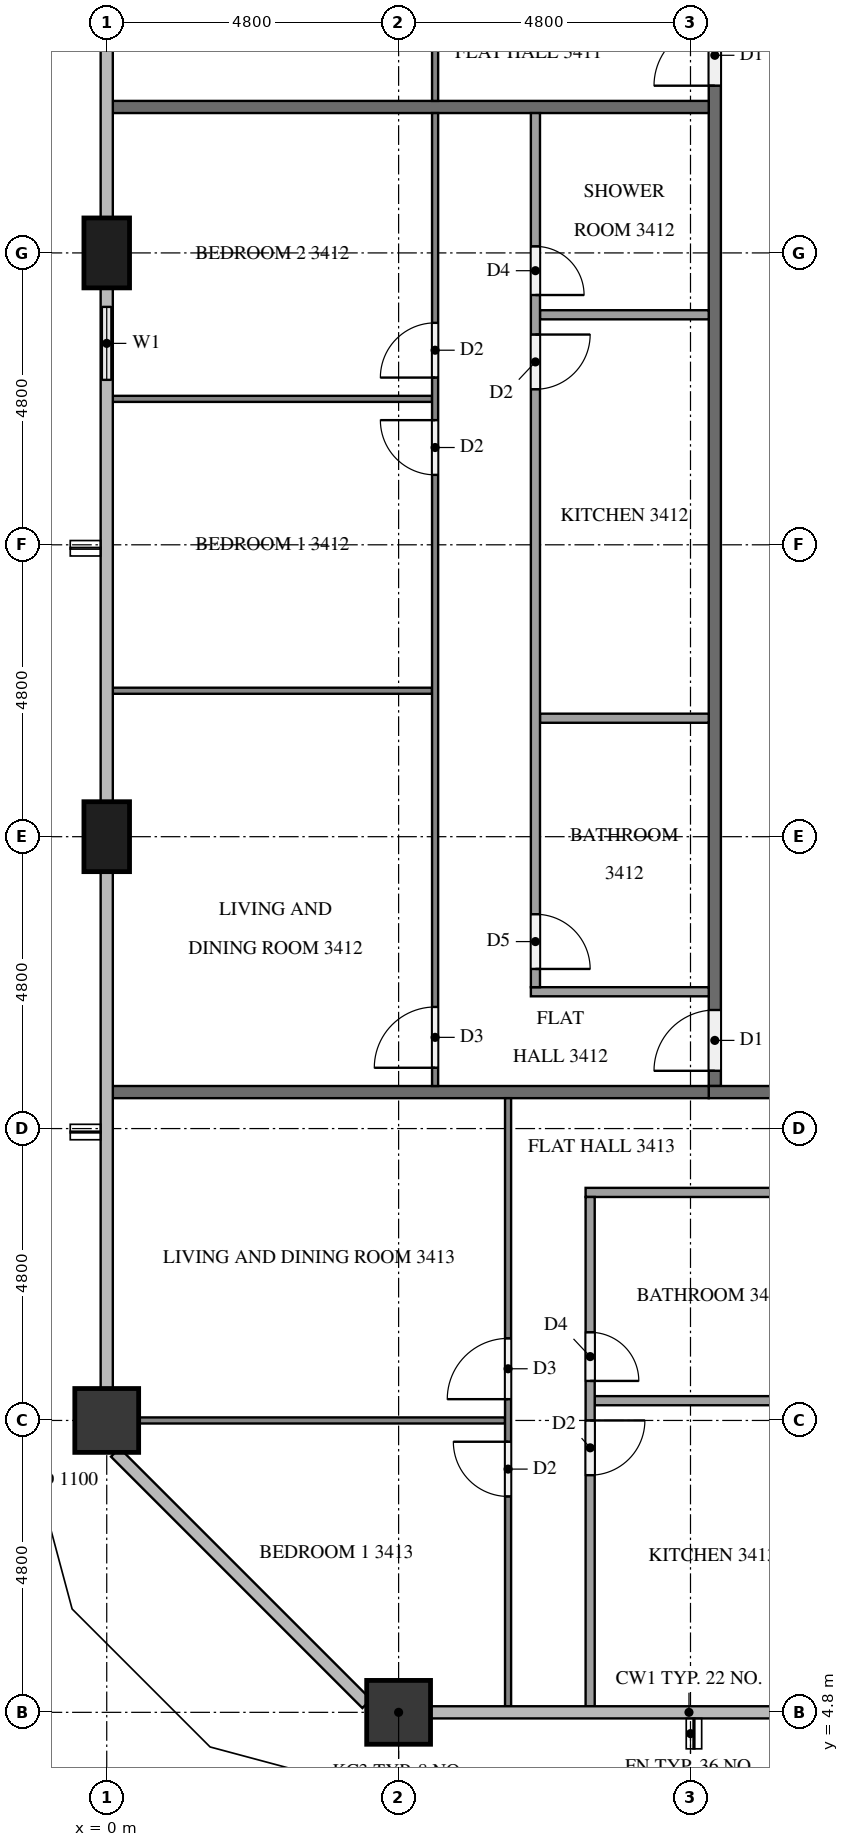
"""IFC4 building model, lengths in metres.
Left out: names, types, materials, properties, quantities, classifications, styles, units other than length and angle.
Written with IfcOpenShell. Run it as: python <this file> out.ifc"""

import sys

from ifc_helpers import new_model, si_unit, direction, frame, frame_2d, origin, origin_2d, place, context, subcontext, project, spatial, rectangle, extrude, element, fill, save


model = new_model("IFC4")
c1 = context("Model", 3, precision=1e-05, world=origin(), true_north=direction((0.0, 1.0)))
c2 = subcontext(c1, "Body", "Model", "MODEL_VIEW")
j1 = project(units=[si_unit("LENGTHUNIT", "METRE"), si_unit("PLANEANGLEUNIT", "RADIAN")], contexts=[c1])
p1 = place(None, origin())
s1 = spatial("IfcSite", under=j1, at=p1, CompositionType="ELEMENT")
p2 = place(p1, origin())
s2 = spatial("IfcBuilding", under=s1, at=p2, CompositionType="ELEMENT")
p3 = place(p2, frame((0.0, 0.0, 133.1)))
s3 = spatial("IfcBuildingStorey", under=s2, at=p3, CompositionType="ELEMENT", Elevation=133.1)
p4 = place(p3, frame((4.8, 4.8, 0.0), z_axis=(0.0, 0.0, 1.0), x_axis=(1.0, 0.0, 0.0)))
e1 = element("IfcColumn", 1, at=p4, inside=s3, PredefinedType="COLUMN", context=c2, shape_type="SweptSolid", body=[
    extrude(rectangle(XDim=1.05, YDim=1.05, at=origin_2d()), origin(), (0.0, 0.0, 1.0), 3.2),
])
for number, where, z_axis, x_axis in (
    (2, (0.0, 28.8, 0.0), (0.0, 0.0, 1.0), (0.0, 1.0, 0.0)),
    (3, (0.0, 19.2, 0.0), (0.0, 0.0, 1.0), (0.0, 1.0, 0.0)),
):
    element("IfcColumn", number, at=place(p3, frame(where, z_axis=z_axis, x_axis=x_axis)), inside=s3, PredefinedType="COLUMN", context=c2, shape_type="SweptSolid", body=[
        extrude(rectangle(XDim=1.15, YDim=0.75, at=origin_2d()), origin(), (0.0, 0.0, 1.0), 3.2),
    ])
p5 = place(p3, frame((0.0, 9.6, 0.0), z_axis=(0.0, 0.0, 1.0), x_axis=(1.0, 0.0, 0.0)))
e4 = element("IfcColumn", 4, at=p5, inside=s3, PredefinedType="COLUMN", context=c2, shape_type="SweptSolid", body=[
    extrude(rectangle(XDim=1.05, YDim=1.05, at=origin_2d()), origin(), (0.0, 0.0, 1.0), 3.2),
])
p6 = place(p3, frame((0.0, 28.225, 0.0), z_axis=(0.0, 0.0, 1.0), x_axis=(0.0, -1.0, 0.0)))
e5 = element("IfcWall", 5, at=p6, inside=s3, PredefinedType="SOLIDWALL", context=c2, shape_type="SweptSolid", body=[
    extrude(rectangle(XDim=1.825, YDim=0.15, at=frame_2d((0.913, 0.0))), origin(), (0.0, 0.0, 1.0), 3.2),
])
p7 = place(p6, frame((0.312, 0.0, 0.9)))
e6 = element("IfcOpeningElement", 6, at=p7, cuts=e5, PredefinedType="OPENING", context=c2, shape_type="SweptSolid", body=[
    extrude(rectangle(XDim=1.2, YDim=1.4, at=frame_2d((0.6, 0.7))), frame((0.0, 0.085, 0.0), z_axis=(0.0, -1.0, 0.0), x_axis=(1.0, 0.0, 0.0)), (0.0, 0.0, 1.0), 0.17),
])
p8 = place(p3, frame((10.0, 15.1, 0.0), z_axis=(0.0, 0.0, 1.0), x_axis=(0.0, 1.0, 0.0)))
e7 = element("IfcWall", 7, at=p8, inside=s3, PredefinedType="PARTITIONING", context=c2, shape_type="SweptSolid", body=[
    extrude(rectangle(XDim=22.6, YDim=0.2, at=frame_2d((11.3, 0.0))), origin(), (0.0, 0.0, 1.0), 3.2),
])
p9 = place(p8, frame((16.45, 0.0, 0.0)))
e8 = element("IfcOpeningElement", 8, at=p9, cuts=e7, PredefinedType="OPENING", context=c2, shape_type="SweptSolid", body=[
    extrude(rectangle(XDim=1.0, YDim=2.1, at=frame_2d((0.5, 1.05))), frame((0.0, 0.11, 0.0), z_axis=(0.0, -1.0, 0.0), x_axis=(1.0, 0.0, 0.0)), (0.0, 0.0, 1.0), 0.22),
])
p10 = place(p8, frame((0.25, 0.0, 0.0)))
e9 = element("IfcOpeningElement", 9, at=p10, cuts=e7, PredefinedType="OPENING", context=c2, shape_type="SweptSolid", body=[
    extrude(rectangle(XDim=1.0, YDim=2.1, at=frame_2d((0.5, 1.05))), frame((0.0, 0.11, 0.0), z_axis=(0.0, -1.0, 0.0), x_axis=(1.0, 0.0, 0.0)), (0.0, 0.0, 1.0), 0.22),
])
p11 = place(p3, frame((9.9, 15.0, 0.0), z_axis=(0.0, 0.0, 1.0), x_axis=(1.0, 0.0, 0.0)))
e10 = element("IfcWall", 10, at=p11, inside=s3, PredefinedType="PARTITIONING", context=c2, shape_type="SweptSolid", body=[
    extrude(rectangle(XDim=2.2, YDim=0.2, at=frame_2d((1.1, 0.0))), origin(), (0.0, 0.0, 1.0), 3.2),
])
for number, where, z_axis, x_axis in (
    (11, (0.1, 31.2, 0.0), (0.0, 0.0, 1.0), (1.0, 0.0, 0.0)),
    (12, (0.1, 15.0, 0.0), (0.0, 0.0, 1.0), (1.0, 0.0, 0.0)),
):
    element("IfcWall", number, at=place(p3, frame(where, z_axis=z_axis, x_axis=x_axis)), inside=s3, PredefinedType="PARTITIONING", context=c2, shape_type="SweptSolid", body=[
        extrude(rectangle(XDim=9.8, YDim=0.2, at=frame_2d((4.9, 0.0))), origin(), (0.0, 0.0, 1.0), 3.2),
    ])
p12 = place(p3, frame((5.4, 31.3, 0.0), z_axis=(0.0, 0.0, 1.0), x_axis=(0.0, 1.0, 0.0)))
e13 = element("IfcWall", 13, at=p12, inside=s3, PredefinedType="PARTITIONING", context=c2, shape_type="SweptSolid", body=[
    extrude(rectangle(XDim=6.4, YDim=0.1, at=frame_2d((3.2, 0.0))), origin(), (0.0, 0.0, 1.0), 3.2),
])
p13 = place(p12, frame((5.1, 0.0, 0.0)))
e14 = element("IfcOpeningElement", 14, at=p13, cuts=e13, PredefinedType="OPENING", context=c2, shape_type="SweptSolid", body=[
    extrude(rectangle(XDim=1.0, YDim=2.1, at=frame_2d((0.5, 1.05))), frame((0.0, 0.06, 0.0), z_axis=(0.0, -1.0, 0.0), x_axis=(1.0, 0.0, 0.0)), (0.0, 0.0, 1.0), 0.12),
])
for number, where, z_axis, x_axis in (
    (15, (5.35, 21.6, 0.0), (0.0, 0.0, 1.0), (-1.0, 0.0, 0.0)),
    (16, (5.35, 26.4, 0.0), (0.0, 0.0, 1.0), (-1.0, 0.0, 0.0)),
):
    element("IfcWall", number, at=place(p3, frame(where, z_axis=z_axis, x_axis=x_axis)), inside=s3, PredefinedType="PARTITIONING", context=c2, shape_type="SweptSolid", body=[
        extrude(rectangle(XDim=5.25, YDim=0.1, at=frame_2d((2.625, 0.0))), origin(), (0.0, 0.0, 1.0), 3.2),
    ])
p14 = place(p3, frame((5.4, 15.1, 0.0), z_axis=(0.0, 0.0, 1.0), x_axis=(0.0, 1.0, 0.0)))
e17 = element("IfcWall", 17, at=p14, inside=s3, PredefinedType="PARTITIONING", context=c2, shape_type="SweptSolid", body=[
    extrude(rectangle(XDim=16.0, YDim=0.1, at=frame_2d((8.0, 0.0))), origin(), (0.0, 0.0, 1.0), 3.2),
])
p15 = place(p14, frame((0.3, 0.0, 0.0)))
e18 = element("IfcOpeningElement", 18, at=p15, cuts=e17, PredefinedType="OPENING", context=c2, shape_type="SweptSolid", body=[
    extrude(rectangle(XDim=1.0, YDim=2.1, at=frame_2d((0.5, 1.05))), frame((0.0, 0.06, 0.0), z_axis=(0.0, -1.0, 0.0), x_axis=(1.0, 0.0, 0.0)), (0.0, 0.0, 1.0), 0.12),
])
p16 = place(p14, frame((10.05, 0.0, 0.0)))
e19 = element("IfcOpeningElement", 19, at=p16, cuts=e17, PredefinedType="OPENING", context=c2, shape_type="SweptSolid", body=[
    extrude(rectangle(XDim=0.9, YDim=2.1, at=frame_2d((0.45, 1.05))), frame((0.0, 0.06, 0.0), z_axis=(0.0, -1.0, 0.0), x_axis=(1.0, 0.0, 0.0)), (0.0, 0.0, 1.0), 0.12),
])
p17 = place(p14, frame((11.65, 0.0, 0.0)))
e20 = element("IfcOpeningElement", 20, at=p17, cuts=e17, PredefinedType="OPENING", context=c2, shape_type="SweptSolid", body=[
    extrude(rectangle(XDim=0.9, YDim=2.1, at=frame_2d((0.45, 1.05))), frame((0.0, 0.06, 0.0), z_axis=(0.0, -1.0, 0.0), x_axis=(1.0, 0.0, 0.0)), (0.0, 0.0, 1.0), 0.12),
])
for number, where, z_axis, x_axis in (
    (21, (9.9, 21.148, 0.0), (0.0, 0.0, 1.0), (-1.0, 0.0, 0.0)),
    (22, (9.9, 27.783, 0.0), (0.0, 0.0, 1.0), (-1.0, 0.0, 0.0)),
):
    element("IfcWall", number, at=place(p3, frame(where, z_axis=z_axis, x_axis=x_axis)), inside=s3, PredefinedType="PARTITIONING", context=c2, shape_type="SweptSolid", body=[
        extrude(rectangle(XDim=2.775, YDim=0.15, at=frame_2d((1.387, 0.0))), origin(), (0.0, 0.0, 1.0), 3.2),
    ])
p18 = place(p3, frame((9.9, 16.65, 0.0), z_axis=(0.0, 0.0, 1.0), x_axis=(-1.0, 0.0, 0.0)))
e23 = element("IfcWall", 23, at=p18, inside=s3, PredefinedType="PARTITIONING", context=c2, shape_type="SweptSolid", body=[
    extrude(rectangle(XDim=2.925, YDim=0.15, at=frame_2d((1.462, 0.0))), origin(), (0.0, 0.0, 1.0), 3.2),
])
p19 = place(p3, frame((7.05, 31.1, 0.0), z_axis=(0.0, 0.0, 1.0), x_axis=(0.0, -1.0, 0.0)))
e24 = element("IfcWall", 24, at=p19, inside=s3, PredefinedType="PARTITIONING", context=c2, shape_type="SweptSolid", body=[
    extrude(rectangle(XDim=14.375, YDim=0.15, at=frame_2d((7.188, 0.0))), origin(), (0.0, 0.0, 1.0), 3.2),
])
p20 = place(p19, frame((13.175, 0.0, 0.0)))
e25 = element("IfcOpeningElement", 25, at=p20, cuts=e24, PredefinedType="OPENING", context=c2, shape_type="SweptSolid", body=[
    extrude(rectangle(XDim=0.9, YDim=2.1, at=frame_2d((0.45, 1.05))), frame((0.0, 0.085, 0.0), z_axis=(0.0, -1.0, 0.0), x_axis=(1.0, 0.0, 0.0)), (0.0, 0.0, 1.0), 0.17),
])
p21 = place(p19, frame((3.642, 0.0, 0.0)))
e26 = element("IfcOpeningElement", 26, at=p21, cuts=e24, PredefinedType="OPENING", context=c2, shape_type="SweptSolid", body=[
    extrude(rectangle(XDim=0.9, YDim=2.1, at=frame_2d((0.45, 1.05))), frame((0.0, 0.085, 0.0), z_axis=(0.0, -1.0, 0.0), x_axis=(1.0, 0.0, 0.0)), (0.0, 0.0, 1.0), 0.17),
])
p22 = place(p19, frame((2.192, 0.0, 0.0)))
e27 = element("IfcOpeningElement", 27, at=p22, cuts=e24, PredefinedType="OPENING", context=c2, shape_type="SweptSolid", body=[
    extrude(rectangle(XDim=0.8, YDim=2.1, at=frame_2d((0.4, 1.05))), frame((0.0, 0.085, 0.0), z_axis=(0.0, -1.0, 0.0), x_axis=(1.0, 0.0, 0.0)), (0.0, 0.0, 1.0), 0.17),
])
p23 = place(p3, frame((6.55, 9.6, 0.0), z_axis=(0.0, 0.0, 1.0), x_axis=(-1.0, 0.0, 0.0)))
e28 = element("IfcWall", 28, at=p23, inside=s3, PredefinedType="PARTITIONING", context=c2, shape_type="SweptSolid", body=[
    extrude(rectangle(XDim=6.025, YDim=0.1, at=frame_2d((3.013, 0.0))), origin(), (0.0, 0.0, 1.0), 3.2),
])
p24 = place(p3, frame((6.6, 4.9, 0.0), z_axis=(0.0, 0.0, 1.0), x_axis=(0.0, 1.0, 0.0)))
e29 = element("IfcWall", 29, at=p24, inside=s3, PredefinedType="PARTITIONING", context=c2, shape_type="SweptSolid", body=[
    extrude(rectangle(XDim=10.0, YDim=0.1, at=frame_2d((5.0, 0.0))), origin(), (0.0, 0.0, 1.0), 3.2),
])
p25 = place(p24, frame((5.05, 0.0, 0.0)))
e30 = element("IfcOpeningElement", 30, at=p25, cuts=e29, PredefinedType="OPENING", context=c2, shape_type="SweptSolid", body=[
    extrude(rectangle(XDim=1.0, YDim=2.1, at=frame_2d((0.5, 1.05))), frame((0.0, 0.06, 0.0), z_axis=(0.0, -1.0, 0.0), x_axis=(1.0, 0.0, 0.0)), (0.0, 0.0, 1.0), 0.12),
])
p26 = place(p24, frame((3.45, 0.0, 0.0)))
e31 = element("IfcOpeningElement", 31, at=p26, cuts=e29, PredefinedType="OPENING", context=c2, shape_type="SweptSolid", body=[
    extrude(rectangle(XDim=0.9, YDim=2.1, at=frame_2d((0.45, 1.05))), frame((0.0, 0.06, 0.0), z_axis=(0.0, -1.0, 0.0), x_axis=(1.0, 0.0, 0.0)), (0.0, 0.0, 1.0), 0.12),
])
p27 = place(p3, frame((11.9, 9.925, 0.0), z_axis=(0.0, 0.0, 1.0), x_axis=(-1.0, 0.0, 0.0)))
e32 = element("IfcWall", 32, at=p27, inside=s3, PredefinedType="PARTITIONING", context=c2, shape_type="SweptSolid", body=[
    extrude(rectangle(XDim=3.875, YDim=0.15, at=frame_2d((1.938, 0.0))), origin(), (0.0, 0.0, 1.0), 3.2),
])
p28 = place(p3, frame((11.9, 13.35, 0.0), z_axis=(0.0, 0.0, 1.0), x_axis=(-1.0, 0.0, 0.0)))
e33 = element("IfcWall", 33, at=p28, inside=s3, PredefinedType="PARTITIONING", context=c2, shape_type="SweptSolid", body=[
    extrude(rectangle(XDim=4.025, YDim=0.15, at=frame_2d((2.012, 0.0))), origin(), (0.0, 0.0, 1.0), 3.2),
])
p29 = place(p3, frame((7.95, 13.275, 0.0), z_axis=(0.0, 0.0, 1.0), x_axis=(0.0, -1.0, 0.0)))
e34 = element("IfcWall", 34, at=p29, inside=s3, PredefinedType="PARTITIONING", context=c2, shape_type="SweptSolid", body=[
    extrude(rectangle(XDim=8.375, YDim=0.15, at=frame_2d((4.188, 0.0))), origin(), (0.0, 0.0, 1.0), 3.2),
])
p30 = place(p29, frame((2.225, 0.0, 0.0)))
e35 = element("IfcOpeningElement", 35, at=p30, cuts=e34, PredefinedType="OPENING", context=c2, shape_type="SweptSolid", body=[
    extrude(rectangle(XDim=0.8, YDim=2.1, at=frame_2d((0.4, 1.05))), frame((0.0, 0.085, 0.0), z_axis=(0.0, -1.0, 0.0), x_axis=(1.0, 0.0, 0.0)), (0.0, 0.0, 1.0), 0.17),
])
p31 = place(p29, frame((3.675, 0.0, 0.0)))
e36 = element("IfcOpeningElement", 36, at=p31, cuts=e34, PredefinedType="OPENING", context=c2, shape_type="SweptSolid", body=[
    extrude(rectangle(XDim=0.9, YDim=2.1, at=frame_2d((0.45, 1.05))), frame((0.0, 0.085, 0.0), z_axis=(0.0, -1.0, 0.0), x_axis=(1.0, 0.0, 0.0)), (0.0, 0.0, 1.0), 0.17),
])
p32 = place(p7, origin())
e37 = element("IfcWindow", 37, at=p32, inside=s3, PartitioningType="SINGLE_PANEL", PredefinedType="WINDOW", context=c2, shape_type="SweptSolid", body=[
    extrude(rectangle(XDim=1.2, YDim=1.4, at=frame_2d((0.6, 0.7))), frame((0.0, 0.03, 0.0), z_axis=(0.0, -1.0, 0.0), x_axis=(1.0, 0.0, 0.0)), (0.0, 0.0, 1.0), 0.06),
])
fill(e6, e37)
p33 = place(p9, origin())
e38 = element("IfcDoor", 38, at=p33, inside=s3, OperationType="SINGLE_SWING_LEFT", PredefinedType="DOOR", context=c2, shape_type="SweptSolid", body=[
    extrude(rectangle(XDim=1.0, YDim=2.1, at=frame_2d((0.5, 1.05))), frame((0.0, 0.025, 0.0), z_axis=(0.0, -1.0, 0.0), x_axis=(1.0, 0.0, 0.0)), (0.0, 0.0, 1.0), 0.05),
])
fill(e8, e38)
p34 = place(p10, origin())
e39 = element("IfcDoor", 39, at=p34, inside=s3, OperationType="SINGLE_SWING_LEFT", PredefinedType="DOOR", context=c2, shape_type="SweptSolid", body=[
    extrude(rectangle(XDim=1.0, YDim=2.1, at=frame_2d((0.5, 1.05))), frame((0.0, 0.025, 0.0), z_axis=(0.0, -1.0, 0.0), x_axis=(1.0, 0.0, 0.0)), (0.0, 0.0, 1.0), 0.05),
])
fill(e9, e39)
p35 = place(p15, origin())
e40 = element("IfcDoor", 40, at=p35, inside=s3, OperationType="SINGLE_SWING_LEFT", PredefinedType="DOOR", context=c2, shape_type="SweptSolid", body=[
    extrude(rectangle(XDim=1.0, YDim=2.1, at=frame_2d((0.5, 1.05))), frame((0.0, 0.025, 0.0), z_axis=(0.0, -1.0, 0.0), x_axis=(1.0, 0.0, 0.0)), (0.0, 0.0, 1.0), 0.05),
])
fill(e18, e40)
p36 = place(p16, origin())
e41 = element("IfcDoor", 41, at=p36, inside=s3, OperationType="SINGLE_SWING_RIGHT", PredefinedType="DOOR", context=c2, shape_type="SweptSolid", body=[
    extrude(rectangle(XDim=0.9, YDim=2.1, at=frame_2d((0.45, 1.05))), frame((0.0, 0.025, 0.0), z_axis=(0.0, -1.0, 0.0), x_axis=(1.0, 0.0, 0.0)), (0.0, 0.0, 1.0), 0.05),
])
fill(e19, e41)
p37 = place(p17, origin())
e42 = element("IfcDoor", 42, at=p37, inside=s3, OperationType="SINGLE_SWING_LEFT", PredefinedType="DOOR", context=c2, shape_type="SweptSolid", body=[
    extrude(rectangle(XDim=0.9, YDim=2.1, at=frame_2d((0.45, 1.05))), frame((0.0, 0.025, 0.0), z_axis=(0.0, -1.0, 0.0), x_axis=(1.0, 0.0, 0.0)), (0.0, 0.0, 1.0), 0.05),
])
fill(e20, e42)
p38 = place(p20, origin())
e43 = element("IfcDoor", 43, at=p38, inside=s3, OperationType="SINGLE_SWING_RIGHT", PredefinedType="DOOR", context=c2, shape_type="SweptSolid", body=[
    extrude(rectangle(XDim=0.9, YDim=2.1, at=frame_2d((0.45, 1.05))), frame((0.0, 0.025, 0.0), z_axis=(0.0, -1.0, 0.0), x_axis=(1.0, 0.0, 0.0)), (0.0, 0.0, 1.0), 0.05),
])
fill(e25, e43)
p39 = place(p21, origin())
e44 = element("IfcDoor", 44, at=p39, inside=s3, OperationType="SINGLE_SWING_LEFT", PredefinedType="DOOR", context=c2, shape_type="SweptSolid", body=[
    extrude(rectangle(XDim=0.9, YDim=2.1, at=frame_2d((0.45, 1.05))), frame((0.0, 0.025, 0.0), z_axis=(0.0, -1.0, 0.0), x_axis=(1.0, 0.0, 0.0)), (0.0, 0.0, 1.0), 0.05),
])
fill(e26, e44)
p40 = place(p22, origin())
e45 = element("IfcDoor", 45, at=p40, inside=s3, OperationType="SINGLE_SWING_RIGHT", PredefinedType="DOOR", context=c2, shape_type="SweptSolid", body=[
    extrude(rectangle(XDim=0.8, YDim=2.1, at=frame_2d((0.4, 1.05))), frame((0.0, 0.025, 0.0), z_axis=(0.0, -1.0, 0.0), x_axis=(1.0, 0.0, 0.0)), (0.0, 0.0, 1.0), 0.05),
])
fill(e27, e45)
p41 = place(p25, origin())
e46 = element("IfcDoor", 46, at=p41, inside=s3, OperationType="SINGLE_SWING_LEFT", PredefinedType="DOOR", context=c2, shape_type="SweptSolid", body=[
    extrude(rectangle(XDim=1.0, YDim=2.1, at=frame_2d((0.5, 1.05))), frame((0.0, 0.025, 0.0), z_axis=(0.0, -1.0, 0.0), x_axis=(1.0, 0.0, 0.0)), (0.0, 0.0, 1.0), 0.05),
])
fill(e30, e46)
p42 = place(p26, origin())
e47 = element("IfcDoor", 47, at=p42, inside=s3, OperationType="SINGLE_SWING_RIGHT", PredefinedType="DOOR", context=c2, shape_type="SweptSolid", body=[
    extrude(rectangle(XDim=0.9, YDim=2.1, at=frame_2d((0.45, 1.05))), frame((0.0, 0.025, 0.0), z_axis=(0.0, -1.0, 0.0), x_axis=(1.0, 0.0, 0.0)), (0.0, 0.0, 1.0), 0.05),
])
fill(e31, e47)
p43 = place(p30, origin())
e48 = element("IfcDoor", 48, at=p43, inside=s3, OperationType="SINGLE_SWING_RIGHT", PredefinedType="DOOR", context=c2, shape_type="SweptSolid", body=[
    extrude(rectangle(XDim=0.8, YDim=2.1, at=frame_2d((0.4, 1.05))), frame((0.0, 0.025, 0.0), z_axis=(0.0, -1.0, 0.0), x_axis=(1.0, 0.0, 0.0)), (0.0, 0.0, 1.0), 0.05),
])
fill(e35, e48)
p44 = place(p31, origin())
e49 = element("IfcDoor", 49, at=p44, inside=s3, OperationType="SINGLE_SWING_LEFT", PredefinedType="DOOR", context=c2, shape_type="SweptSolid", body=[
    extrude(rectangle(XDim=0.9, YDim=2.1, at=frame_2d((0.45, 1.05))), frame((0.0, 0.025, 0.0), z_axis=(0.0, -1.0, 0.0), x_axis=(1.0, 0.0, 0.0)), (0.0, 0.0, 1.0), 0.05),
])
fill(e36, e49)
save(model, sys.argv[1])
